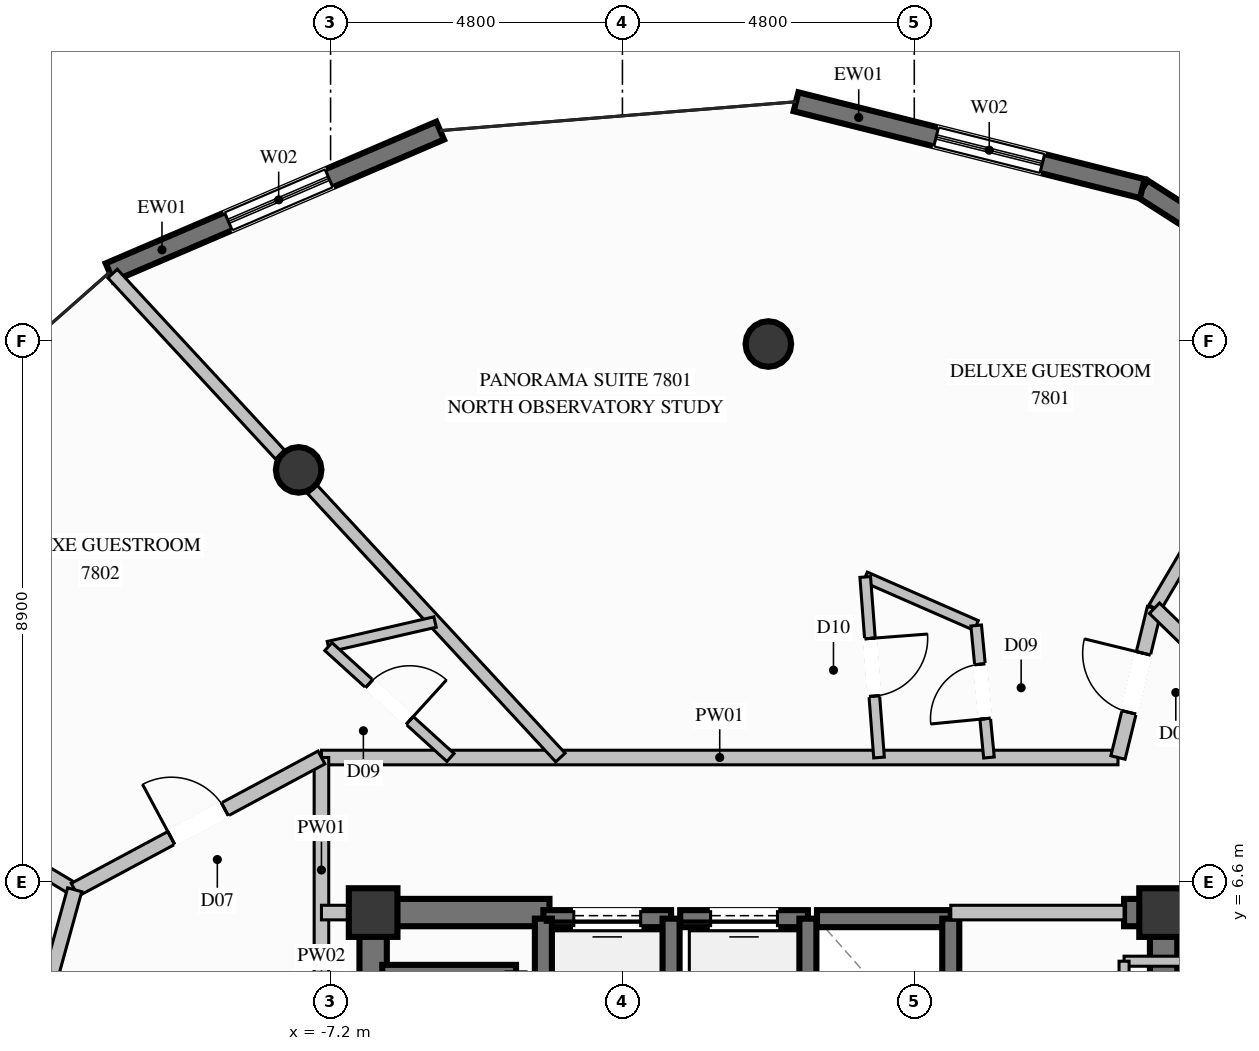
"""IFC4 building model, lengths in metres.
Left out: names, types, materials, properties, quantities, classifications, styles, units other than length and angle.
Written with IfcOpenShell. Run it as: python <this file> out.ifc"""

import sys

from ifc_helpers import new_model, si_unit, direction, frame, frame_2d, origin, origin_2d, place, context, subcontext, project, spatial, rectangle, circle, extrude, element, fill, save


model = new_model("IFC4")
c1 = context("Model", 3, precision=1e-05, world=origin(), true_north=direction((0.0, 1.0)))
c2 = subcontext(c1, "Body", "Model", "MODEL_VIEW")
j1 = project(units=[si_unit("LENGTHUNIT", "METRE"), si_unit("PLANEANGLEUNIT", "RADIAN")], contexts=[c1])
p1 = place(None, origin())
s1 = spatial("IfcSite", under=j1, at=p1, CompositionType="ELEMENT")
p2 = place(p1, origin())
s2 = spatial("IfcBuilding", under=s1, at=p2, CompositionType="ELEMENT")
p3 = place(p2, frame((0.0, 0.0, 293.4)))
s3 = spatial("IfcBuildingStorey", under=s2, at=p3, CompositionType="ELEMENT", Elevation=293.4)
for number, where, z_axis, x_axis in (
    (1, (6.5, 6.1, 0.0), (0.0, 0.0, 1.0), (1.0, 0.0, 0.0)),
    (2, (-6.5, 6.1, 0.0), (0.0, 0.0, 1.0), (1.0, 0.0, 0.0)),
):
    element("IfcColumn", number, at=place(p3, frame(where, z_axis=z_axis, x_axis=x_axis)), inside=s3, PredefinedType="COLUMN", context=c2, shape_type="SweptSolid", body=[
        extrude(rectangle(XDim=0.8, YDim=0.8, at=origin_2d()), origin(), (0.0, 0.0, 1.0), 3.8),
    ])
p4 = place(p3, frame((-6.275, 6.1, 0.0), z_axis=(0.0, 0.0, 1.0), x_axis=(1.0, 0.0, 0.0)))
e3 = element("IfcWall", 3, at=p4, inside=s3, PredefinedType="SHEAR", context=c2, shape_type="SweptSolid", body=[
    extrude(rectangle(XDim=2.675, YDim=0.45, at=frame_2d((1.337, 0.0))), origin(), (0.0, 0.0, 1.0), 3.8),
])
p5 = place(p3, frame((5.85, 6.1, 0.0), z_axis=(0.0, 0.0, 1.0), x_axis=(1.0, 0.0, 0.0)))
e4 = element("IfcWall", 4, at=p5, inside=s3, PredefinedType="SHEAR", context=c2, shape_type="SweptSolid", body=[
    extrude(rectangle(XDim=0.425, YDim=0.45, at=frame_2d((0.212, 0.0))), origin(), (0.0, 0.0, 1.0), 3.8),
])
p6 = place(p3, frame((-6.5, 2.35, 0.0), z_axis=(0.0, 0.0, 1.0), x_axis=(0.0, 1.0, 0.0)))
e5 = element("IfcWall", 5, at=p6, inside=s3, PredefinedType="SHEAR", context=c2, shape_type="SweptSolid", body=[
    extrude(rectangle(XDim=3.975, YDim=0.45, at=frame_2d((1.987, 0.0))), origin(), (0.0, 0.0, 1.0), 3.8),
])
p7 = place(p3, frame((6.5, 3.35, 0.0), z_axis=(0.0, 0.0, 1.0), x_axis=(0.0, 1.0, 0.0)))
e6 = element("IfcWall", 6, at=p7, inside=s3, PredefinedType="SHEAR", context=c2, shape_type="SweptSolid", body=[
    extrude(rectangle(XDim=2.975, YDim=0.45, at=frame_2d((1.487, 0.0))), origin(), (0.0, 0.0, 1.0), 3.8),
])
for number, where, z_axis, x_axis in (
    (7, (0.0, 15.45, 0.0), (0.0, 0.0, 1.0), (1.0, 0.0, 0.0)),
    (8, (-7.725, 13.38, 0.0), (0.0, 0.0, 1.0), (1.0, 0.0, 0.0)),
):
    element("IfcColumn", number, at=place(p3, frame(where, z_axis=z_axis, x_axis=x_axis)), inside=s3, PredefinedType="COLUMN", context=c2, shape_type="SweptSolid", body=[
        extrude(circle(Radius=0.375, at=origin_2d()), origin(), (0.0, 0.0, 1.0), 3.8),
    ])
p8 = place(p3, frame((6.15, 18.006, 0.0), z_axis=(0.0, 0.0, 1.0), x_axis=(0.842074251432, -0.539361618095, 0.0)))
e9 = element("IfcWall", 9, at=p8, inside=s3, PredefinedType="SOLIDWALL", context=c2, shape_type="SweptSolid", body=[
    extrude(rectangle(XDim=5.917, YDim=0.32, at=frame_2d((2.958, 0.0))), origin(), (0.0, 0.0, 1.0), 3.57),
])
p9 = place(p8, frame((0.892, 0.0, 0.35)))
e10 = element("IfcOpeningElement", 10, at=p9, cuts=e9, PredefinedType="OPENING", context=c2, shape_type="SweptSolid", body=[
    extrude(rectangle(XDim=1.8, YDim=2.6, at=frame_2d((0.9, 1.3))), frame((0.0, 0.17, 0.0), z_axis=(0.0, -1.0, 0.0), x_axis=(1.0, 0.0, 0.0)), (0.0, 0.0, 1.0), 0.34),
])
p10 = place(p3, frame((0.455, 19.434, 0.0), z_axis=(0.0, 0.0, 1.0), x_axis=(0.96997103321, -0.243220465285, 0.0)))
e11 = element("IfcWall", 11, at=p10, inside=s3, PredefinedType="SOLIDWALL", context=c2, shape_type="SweptSolid", body=[
    extrude(rectangle(XDim=5.871, YDim=0.32, at=frame_2d((2.936, 0.0))), origin(), (0.0, 0.0, 1.0), 3.57),
])
p11 = place(p10, frame((2.376, 0.0, 0.35)))
e12 = element("IfcOpeningElement", 12, at=p11, cuts=e11, PredefinedType="OPENING", context=c2, shape_type="SweptSolid", body=[
    extrude(rectangle(XDim=1.8, YDim=2.6, at=frame_2d((0.9, 1.3))), frame((0.0, 0.17, 0.0), z_axis=(0.0, -1.0, 0.0), x_axis=(1.0, 0.0, 0.0)), (0.0, 0.0, 1.0), 0.34),
])
p12 = place(p3, frame((-10.835, 16.629, 0.0), z_axis=(0.0, 0.0, 1.0), x_axis=(0.919149299583, 0.393909336112, 0.0)))
e13 = element("IfcWall", 13, at=p12, inside=s3, PredefinedType="SOLIDWALL", context=c2, shape_type="SweptSolid", body=[
    extrude(rectangle(XDim=5.915, YDim=0.32, at=frame_2d((2.958, 0.0))), origin(), (0.0, 0.0, 1.0), 3.57),
])
p13 = place(p12, frame((2.126, 0.0, 0.35)))
e14 = element("IfcOpeningElement", 14, at=p13, cuts=e13, PredefinedType="OPENING", context=c2, shape_type="SweptSolid", body=[
    extrude(rectangle(XDim=1.8, YDim=2.6, at=frame_2d((0.9, 1.3))), frame((0.0, 0.17, 0.0), z_axis=(0.0, -1.0, 0.0), x_axis=(1.0, 0.0, 0.0)), (0.0, 0.0, 1.0), 0.34),
])
p14 = place(p3, frame((-1.6, 6.0, 0.0), z_axis=(0.0, 0.0, 1.0), x_axis=(-1.0, 0.0, 0.0)))
e15 = element("IfcWall", 15, at=p14, inside=s3, PredefinedType="SOLIDWALL", context=c2, shape_type="SweptSolid", body=[
    extrude(rectangle(XDim=2.1, YDim=0.28, at=frame_2d((1.05, 0.0))), origin(), (0.0, 0.0, 1.0), 3.57),
])
p15 = place(p14, frame((0.5, 0.0, 0.0)))
e16 = element("IfcOpeningElement", 16, at=p15, cuts=e15, PredefinedType="OPENING", context=c2, shape_type="SweptSolid", body=[
    extrude(rectangle(XDim=1.1, YDim=2.2, at=frame_2d((0.55, 1.1))), frame((0.0, 0.15, 0.0), z_axis=(0.0, -1.0, 0.0), x_axis=(1.0, 0.0, 0.0)), (0.0, 0.0, 1.0), 0.3),
])
for number, where, z_axis, x_axis in (
    (17, (-3.7, 6.0, 0.0), (0.0, 0.0, 1.0), (0.0, -1.0, 0.0)),
    (18, (-1.6, 3.5, 0.0), (0.0, 0.0, 1.0), (0.0, 1.0, 0.0)),
):
    element("IfcWall", number, at=place(p3, frame(where, z_axis=z_axis, x_axis=x_axis)), inside=s3, PredefinedType="SOLIDWALL", context=c2, shape_type="SweptSolid", body=[
        extrude(rectangle(XDim=2.5, YDim=0.28, at=frame_2d((1.25, 0.0))), origin(), (0.0, 0.0, 1.0), 3.57),
    ])
p16 = place(p3, frame((0.65, 6.0, 0.0), z_axis=(0.0, 0.0, 1.0), x_axis=(-1.0, 0.0, 0.0)))
e19 = element("IfcWall", 19, at=p16, inside=s3, PredefinedType="SOLIDWALL", context=c2, shape_type="SweptSolid", body=[
    extrude(rectangle(XDim=2.1, YDim=0.28, at=frame_2d((1.05, 0.0))), origin(), (0.0, 0.0, 1.0), 3.57),
])
p17 = place(p16, frame((0.5, 0.0, 0.0)))
e20 = element("IfcOpeningElement", 20, at=p17, cuts=e19, PredefinedType="OPENING", context=c2, shape_type="SweptSolid", body=[
    extrude(rectangle(XDim=1.1, YDim=2.2, at=frame_2d((0.55, 1.1))), frame((0.0, 0.15, 0.0), z_axis=(0.0, -1.0, 0.0), x_axis=(1.0, 0.0, 0.0)), (0.0, 0.0, 1.0), 0.3),
])
p18 = place(p3, frame((0.65, 3.5, 0.0), z_axis=(0.0, 0.0, 1.0), x_axis=(0.0, 1.0, 0.0)))
e21 = element("IfcWall", 21, at=p18, inside=s3, PredefinedType="SOLIDWALL", context=c2, shape_type="SweptSolid", body=[
    extrude(rectangle(XDim=2.5, YDim=0.28, at=frame_2d((1.25, 0.0))), origin(), (0.0, 0.0, 1.0), 3.57),
])
p19 = place(p3, frame((3.0, 6.0, 0.0), z_axis=(0.0, 0.0, 1.0), x_axis=(-1.0, 0.0, 0.0)))
e22 = element("IfcWall", 22, at=p19, inside=s3, PredefinedType="SOLIDWALL", context=c2, shape_type="SweptSolid", body=[
    extrude(rectangle(XDim=2.2, YDim=0.28, at=frame_2d((1.1, 0.0))), origin(), (0.0, 0.0, 1.0), 3.57),
])
p20 = place(p3, frame((3.0, 3.5, 0.0), z_axis=(0.0, 0.0, 1.0), x_axis=(0.0, 1.0, 0.0)))
e23 = element("IfcWall", 23, at=p20, inside=s3, PredefinedType="SOLIDWALL", context=c2, shape_type="SweptSolid", body=[
    extrude(rectangle(XDim=2.5, YDim=0.28, at=frame_2d((1.25, 0.0))), origin(), (0.0, 0.0, 1.0), 3.57),
])
p21 = place(p3, frame((-4.15, 5.1, 0.0), z_axis=(0.0, 0.0, 1.0), x_axis=(-1.0, 0.0, 0.0)))
e24 = element("IfcWall", 24, at=p21, inside=s3, PredefinedType="SOLIDWALL", context=c2, shape_type="SweptSolid", body=[
    extrude(rectangle(XDim=2.2, YDim=0.28, at=frame_2d((1.1, 0.0))), origin(), (0.0, 0.0, 1.0), 3.57),
])
p22 = place(p3, frame((-7.35, 8.65, 0.0), z_axis=(0.0, 0.0, 1.0), x_axis=(1.0, 0.0, 0.0)))
e25 = element("IfcWall", 25, at=p22, inside=s3, PredefinedType="PARTITIONING", context=c2, shape_type="SweptSolid", body=[
    extrude(rectangle(XDim=13.1, YDim=0.24, at=frame_2d((6.55, 0.0))), origin(), (0.0, 0.0, 1.0), 3.57),
])
p23 = place(p3, frame((3.0, 6.1, 0.0), z_axis=(0.0, 0.0, 1.0), x_axis=(1.0, 0.0, 0.0)))
e26 = element("IfcWall", 26, at=p23, inside=s3, PredefinedType="PARTITIONING", context=c2, shape_type="SweptSolid", body=[
    extrude(rectangle(XDim=2.85, YDim=0.24, at=frame_2d((1.425, 0.0))), origin(), (0.0, 0.0, 1.0), 2.655),
])
p24 = place(p3, frame((6.5, 6.1, 0.0), z_axis=(0.0, 0.0, 1.0), x_axis=(1.0, 0.0, 0.0)))
e27 = element("IfcWall", 27, at=p24, inside=s3, PredefinedType="PARTITIONING", context=c2, shape_type="SweptSolid", body=[
    extrude(rectangle(XDim=0.85, YDim=0.24, at=frame_2d((0.425, 0.0))), origin(), (0.0, 0.0, 1.0), 3.011),
])
p25 = place(p3, frame((-7.35, 4.95, 0.0), z_axis=(0.0, 0.0, 1.0), x_axis=(0.0, 1.0, 0.0)))
e28 = element("IfcWall", 28, at=p25, inside=s3, PredefinedType="PARTITIONING", context=c2, shape_type="SweptSolid", body=[
    extrude(rectangle(XDim=3.7, YDim=0.24, at=frame_2d((1.85, 0.0))), origin(), (0.0, 0.0, 1.0), 2.655),
])
p26 = place(p3, frame((-7.35, 6.1, 0.0), z_axis=(0.0, 0.0, 1.0), x_axis=(1.0, 0.0, 0.0)))
e29 = element("IfcWall", 29, at=p26, inside=s3, PredefinedType="PARTITIONING", context=c2, shape_type="SweptSolid", body=[
    extrude(rectangle(XDim=0.85, YDim=0.24, at=frame_2d((0.425, 0.0))), origin(), (0.0, 0.0, 1.0), 3.011),
])
p27 = place(p3, frame((7.35, 5.3, 0.0), z_axis=(0.0, 0.0, 1.0), x_axis=(-1.0, 0.0, 0.0)))
e30 = element("IfcWall", 30, at=p27, inside=s3, PredefinedType="PARTITIONING", context=c2, shape_type="SweptSolid", body=[
    extrude(rectangle(XDim=1.5, YDim=0.165, at=frame_2d((0.75, 0.0))), origin(), (0.0, 0.0, 1.0), 2.655),
])
p28 = place(p3, frame((5.85, 5.3, 0.0), z_axis=(0.0, 0.0, 1.0), x_axis=(0.0, -1.0, 0.0)))
e31 = element("IfcWall", 31, at=p28, inside=s3, PredefinedType="PARTITIONING", context=c2, shape_type="SweptSolid", body=[
    extrude(rectangle(XDim=2.55, YDim=0.165, at=frame_2d((1.275, 0.0))), origin(), (0.0, 0.0, 1.0), 2.655),
])
p29 = place(p3, frame((6.35, 11.105, 0.0), z_axis=(0.0, 0.0, 1.0), x_axis=(0.50828242616, 0.86119044076, 0.0)))
e32 = element("IfcWall", 32, at=p29, inside=s3, PredefinedType="PARTITIONING", context=c2, shape_type="SweptSolid", body=[
    extrude(rectangle(XDim=2.264, YDim=0.21, at=frame_2d((1.132, 0.0))), origin(), (0.0, 0.0, 1.0), 3.011),
])
p30 = place(p3, frame((-11.408, 6.475, 0.0), z_axis=(0.0, 0.0, 1.0), x_axis=(-0.858521768477, 0.512777118299, 0.0)))
e33 = element("IfcWall", 33, at=p30, inside=s3, PredefinedType="PARTITIONING", context=c2, shape_type="SweptSolid", body=[
    extrude(rectangle(XDim=1.944, YDim=0.21, at=frame_2d((0.972, 0.0))), origin(), (0.0, 0.0, 1.0), 3.011),
])
p31 = place(p3, frame((1.593, 11.619, 0.0), z_axis=(0.0, 0.0, 1.0), x_axis=(0.916261393795, -0.400580900993, 0.0)))
e34 = element("IfcWall", 34, at=p31, inside=s3, PredefinedType="PLUMBINGWALL", context=c2, shape_type="SweptSolid", body=[
    extrude(rectangle(XDim=1.992, YDim=0.175, at=frame_2d((0.996, 0.0))), origin(), (0.0, 0.0, 1.0), 3.57),
])
p32 = place(p3, frame((1.593, 11.619, 0.0), z_axis=(0.0, 0.0, 1.0), x_axis=(0.076251330091, -0.99708862929, 0.0)))
e35 = element("IfcWall", 35, at=p32, inside=s3, PredefinedType="PLUMBINGWALL", context=c2, shape_type="SweptSolid", body=[
    extrude(rectangle(XDim=2.978, YDim=0.175, at=frame_2d((1.489, 0.0))), origin(), (0.0, 0.0, 1.0), 3.57),
])
p33 = place(p32, frame((1.014, 0.0, 0.0)))
e36 = element("IfcOpeningElement", 36, at=p33, cuts=e35, PredefinedType="OPENING", context=c2, shape_type="SweptSolid", body=[
    extrude(rectangle(XDim=0.95, YDim=2.1, at=frame_2d((0.475, 1.05))), frame((0.0, 0.098, 0.0), z_axis=(0.0, -1.0, 0.0), x_axis=(1.0, 0.0, 0.0)), (0.0, 0.0, 1.0), 0.195),
])
p34 = place(p3, frame((3.628, 8.65, 0.0), z_axis=(0.0, 0.0, 1.0), x_axis=(-0.096256231413, 0.995356588321, 0.0)))
e37 = element("IfcWall", 37, at=p34, inside=s3, PredefinedType="PLUMBINGWALL", context=c2, shape_type="SweptSolid", body=[
    extrude(rectangle(XDim=2.181, YDim=0.175, at=frame_2d((1.091, 0.0))), origin(), (0.0, 0.0, 1.0), 3.57),
])
p35 = place(p34, frame((0.641, 0.0, 0.0)))
e38 = element("IfcOpeningElement", 38, at=p35, cuts=e37, PredefinedType="OPENING", context=c2, shape_type="SweptSolid", body=[
    extrude(rectangle(XDim=0.9, YDim=2.1, at=frame_2d((0.45, 1.05))), frame((0.0, 0.098, 0.0), z_axis=(0.0, -1.0, 0.0), x_axis=(1.0, 0.0, 0.0)), (0.0, 0.0, 1.0), 0.195),
])
p36 = place(p3, frame((5.75, 8.65, 0.0), z_axis=(0.0, 0.0, 1.0), x_axis=(0.237440936779, 0.97140197732, 0.0)))
e39 = element("IfcWall", 39, at=p36, inside=s3, PredefinedType="PARTITIONING", context=c2, shape_type="SweptSolid", body=[
    extrude(rectangle(XDim=2.527, YDim=0.24, at=frame_2d((1.264, 0.0))), origin(), (0.0, 0.0, 1.0), 3.57),
])
p37 = place(p36, frame((0.764, 0.0, 0.0)))
e40 = element("IfcOpeningElement", 40, at=p37, cuts=e39, PredefinedType="OPENING", context=c2, shape_type="SweptSolid", body=[
    extrude(rectangle(XDim=1.0, YDim=2.2, at=frame_2d((0.5, 1.1))), frame((0.0, 0.13, 0.0), z_axis=(0.0, -1.0, 0.0), x_axis=(1.0, 0.0, 0.0)), (0.0, 0.0, 1.0), 0.26),
])
p38 = place(p3, frame((-3.42, 8.65, 0.0), z_axis=(0.0, 0.0, 1.0), x_axis=(-0.679191516768, 0.733961091306, 0.0)))
e41 = element("IfcWall", 41, at=p38, inside=s3, PredefinedType="PARTITIONING", context=c2, shape_type="SweptSolid", body=[
    extrude(rectangle(XDim=6.004, YDim=0.21, at=frame_2d((3.002, 0.0))), origin(), (0.0, 0.0, 1.0), 3.57),
])
p39 = place(p3, frame((-8.03, 13.631, 0.0), z_axis=(0.0, 0.0, 1.0), x_axis=(-0.67921956095, 0.733935138839, 0.0)))
e42 = element("IfcWall", 42, at=p39, inside=s3, PredefinedType="PARTITIONING", context=c2, shape_type="SweptSolid", body=[
    extrude(rectangle(XDim=4.056, YDim=0.21, at=frame_2d((2.028, 0.0))), origin(), (0.0, 0.0, 1.0), 3.57),
])
p40 = place(p3, frame((-7.236, 10.473, 0.0), z_axis=(0.0, 0.0, 1.0), x_axis=(0.974363761538, 0.224978354961, 0.0)))
e43 = element("IfcWall", 43, at=p40, inside=s3, PredefinedType="PLUMBINGWALL", context=c2, shape_type="SweptSolid", body=[
    extrude(rectangle(XDim=1.8, YDim=0.175, at=frame_2d((0.9, 0.0))), origin(), (0.0, 0.0, 1.0), 3.57),
])
p41 = place(p3, frame((-7.236, 10.473, 0.0), z_axis=(0.0, 0.0, 1.0), x_axis=(0.740400174531, -0.672166334738, 0.0)))
e44 = element("IfcWall", 44, at=p41, inside=s3, PredefinedType="PLUMBINGWALL", context=c2, shape_type="SweptSolid", body=[
    extrude(rectangle(XDim=2.712, YDim=0.175, at=frame_2d((1.356, 0.0))), origin(), (0.0, 0.0, 1.0), 3.57),
])
p42 = place(p41, frame((0.906, 0.0, 0.0)))
e45 = element("IfcOpeningElement", 45, at=p42, cuts=e44, PredefinedType="OPENING", context=c2, shape_type="SweptSolid", body=[
    extrude(rectangle(XDim=0.9, YDim=2.1, at=frame_2d((0.45, 1.05))), frame((0.0, 0.098, 0.0), z_axis=(0.0, -1.0, 0.0), x_axis=(1.0, 0.0, 0.0)), (0.0, 0.0, 1.0), 0.195),
])
p43 = place(p3, frame((-11.408, 6.475, 0.0), z_axis=(0.0, 0.0, 1.0), x_axis=(0.881394026477, 0.472381805418, 0.0)))
e46 = element("IfcWall", 46, at=p43, inside=s3, PredefinedType="PARTITIONING", context=c2, shape_type="SweptSolid", body=[
    extrude(rectangle(XDim=4.604, YDim=0.24, at=frame_2d((2.302, 0.0))), origin(), (0.0, 0.0, 1.0), 3.57),
])
p44 = place(p43, frame((1.802, 0.0, 0.0)))
e47 = element("IfcOpeningElement", 47, at=p44, cuts=e46, PredefinedType="OPENING", context=c2, shape_type="SweptSolid", body=[
    extrude(rectangle(XDim=1.0, YDim=2.2, at=frame_2d((0.5, 1.1))), frame((0.0, 0.13, 0.0), z_axis=(0.0, -1.0, 0.0), x_axis=(1.0, 0.0, 0.0)), (0.0, 0.0, 1.0), 0.26),
])
p45 = place(p3, frame((-11.408, 6.475, 0.0), z_axis=(0.0, 0.0, 1.0), x_axis=(-0.265673419644, -0.964063086159, 0.0)))
e48 = element("IfcWall", 48, at=p45, inside=s3, PredefinedType="PARTITIONING", context=c2, shape_type="SweptSolid", body=[
    extrude(rectangle(XDim=2.755, YDim=0.24, at=frame_2d((1.377, 0.0))), origin(), (0.0, 0.0, 1.0), 3.57),
])
p46 = place(p3, frame((9.11, 8.42, 0.0), z_axis=(0.0, 0.0, 1.0), x_axis=(-0.716772179107, 0.697307423779, 0.0)))
e49 = element("IfcWall", 49, at=p46, inside=s3, PredefinedType="PARTITIONING", context=c2, shape_type="SweptSolid", body=[
    extrude(rectangle(XDim=3.851, YDim=0.24, at=frame_2d((1.925, 0.0))), origin(), (0.0, 0.0, 1.0), 3.57),
])
p47 = place(p46, frame((1.425, 0.0, 0.0)))
e50 = element("IfcOpeningElement", 50, at=p47, cuts=e49, PredefinedType="OPENING", context=c2, shape_type="SweptSolid", body=[
    extrude(rectangle(XDim=1.0, YDim=2.2, at=frame_2d((0.5, 1.1))), frame((0.0, 0.13, 0.0), z_axis=(0.0, -1.0, 0.0), x_axis=(1.0, 0.0, 0.0)), (0.0, 0.0, 1.0), 0.26),
])
p48 = place(p11, origin())
e51 = element("IfcWindow", 51, at=p48, inside=s3, PartitioningType="SINGLE_PANEL", PredefinedType="WINDOW", context=c2, shape_type="SweptSolid", body=[
    extrude(rectangle(XDim=1.8, YDim=2.6, at=frame_2d((0.9, 1.3))), frame((0.0, 0.03, 0.0), z_axis=(0.0, -1.0, 0.0), x_axis=(1.0, 0.0, 0.0)), (0.0, 0.0, 1.0), 0.06),
])
fill(e12, e51)
p49 = place(p13, origin())
e52 = element("IfcWindow", 52, at=p49, inside=s3, PartitioningType="SINGLE_PANEL", PredefinedType="WINDOW", context=c2, shape_type="SweptSolid", body=[
    extrude(rectangle(XDim=1.8, YDim=2.6, at=frame_2d((0.9, 1.3))), frame((0.0, 0.03, 0.0), z_axis=(0.0, -1.0, 0.0), x_axis=(1.0, 0.0, 0.0)), (0.0, 0.0, 1.0), 0.06),
])
fill(e14, e52)
p50 = place(p15, origin())
e53 = element("IfcDoor", 53, at=p50, inside=s3, OperationType="SLIDING_TO_LEFT", PredefinedType="DOOR", context=c2, shape_type="SweptSolid", body=[
    extrude(rectangle(XDim=1.1, YDim=2.2, at=frame_2d((0.55, 1.1))), frame((0.0, 0.025, 0.0), z_axis=(0.0, -1.0, 0.0), x_axis=(1.0, 0.0, 0.0)), (0.0, 0.0, 1.0), 0.05),
])
fill(e16, e53)
p51 = place(p17, origin())
e54 = element("IfcDoor", 54, at=p51, inside=s3, OperationType="SLIDING_TO_LEFT", PredefinedType="DOOR", context=c2, shape_type="SweptSolid", body=[
    extrude(rectangle(XDim=1.1, YDim=2.2, at=frame_2d((0.55, 1.1))), frame((0.0, 0.025, 0.0), z_axis=(0.0, -1.0, 0.0), x_axis=(1.0, 0.0, 0.0)), (0.0, 0.0, 1.0), 0.05),
])
fill(e20, e54)
p52 = place(p35, origin())
e55 = element("IfcDoor", 55, at=p52, inside=s3, OperationType="SINGLE_SWING_LEFT", PredefinedType="DOOR", context=c2, shape_type="SweptSolid", body=[
    extrude(rectangle(XDim=0.9, YDim=2.1, at=frame_2d((0.45, 1.05))), frame((0.0, 0.025, 0.0), z_axis=(0.0, -1.0, 0.0), x_axis=(1.0, 0.0, 0.0)), (0.0, 0.0, 1.0), 0.05),
])
fill(e38, e55)
p53 = place(p37, origin())
e56 = element("IfcDoor", 56, at=p53, inside=s3, OperationType="SINGLE_SWING_RIGHT", PredefinedType="DOOR", context=c2, shape_type="SweptSolid", body=[
    extrude(rectangle(XDim=1.0, YDim=2.2, at=frame_2d((0.5, 1.1))), frame((0.0, 0.025, 0.0), z_axis=(0.0, -1.0, 0.0), x_axis=(1.0, 0.0, 0.0)), (0.0, 0.0, 1.0), 0.05),
])
fill(e40, e56)
p54 = place(p33, origin())
e57 = element("IfcDoor", 57, at=p54, inside=s3, OperationType="SINGLE_SWING_LEFT", PredefinedType="DOOR", context=c2, shape_type="SweptSolid", body=[
    extrude(rectangle(XDim=0.95, YDim=2.1, at=frame_2d((0.475, 1.05))), frame((0.0, 0.025, 0.0), z_axis=(0.0, -1.0, 0.0), x_axis=(1.0, 0.0, 0.0)), (0.0, 0.0, 1.0), 0.05),
])
fill(e36, e57)
p55 = place(p42, origin())
e58 = element("IfcDoor", 58, at=p55, inside=s3, OperationType="SINGLE_SWING_RIGHT", PredefinedType="DOOR", context=c2, shape_type="SweptSolid", body=[
    extrude(rectangle(XDim=0.9, YDim=2.1, at=frame_2d((0.45, 1.05))), frame((0.0, 0.025, 0.0), z_axis=(0.0, -1.0, 0.0), x_axis=(1.0, 0.0, 0.0)), (0.0, 0.0, 1.0), 0.05),
])
fill(e45, e58)
p56 = place(p44, origin())
e59 = element("IfcDoor", 59, at=p56, inside=s3, OperationType="SINGLE_SWING_LEFT", PredefinedType="DOOR", context=c2, shape_type="SweptSolid", body=[
    extrude(rectangle(XDim=1.0, YDim=2.2, at=frame_2d((0.5, 1.1))), frame((0.0, 0.025, 0.0), z_axis=(0.0, -1.0, 0.0), x_axis=(1.0, 0.0, 0.0)), (0.0, 0.0, 1.0), 0.05),
])
fill(e47, e59)
save(model, sys.argv[1])
